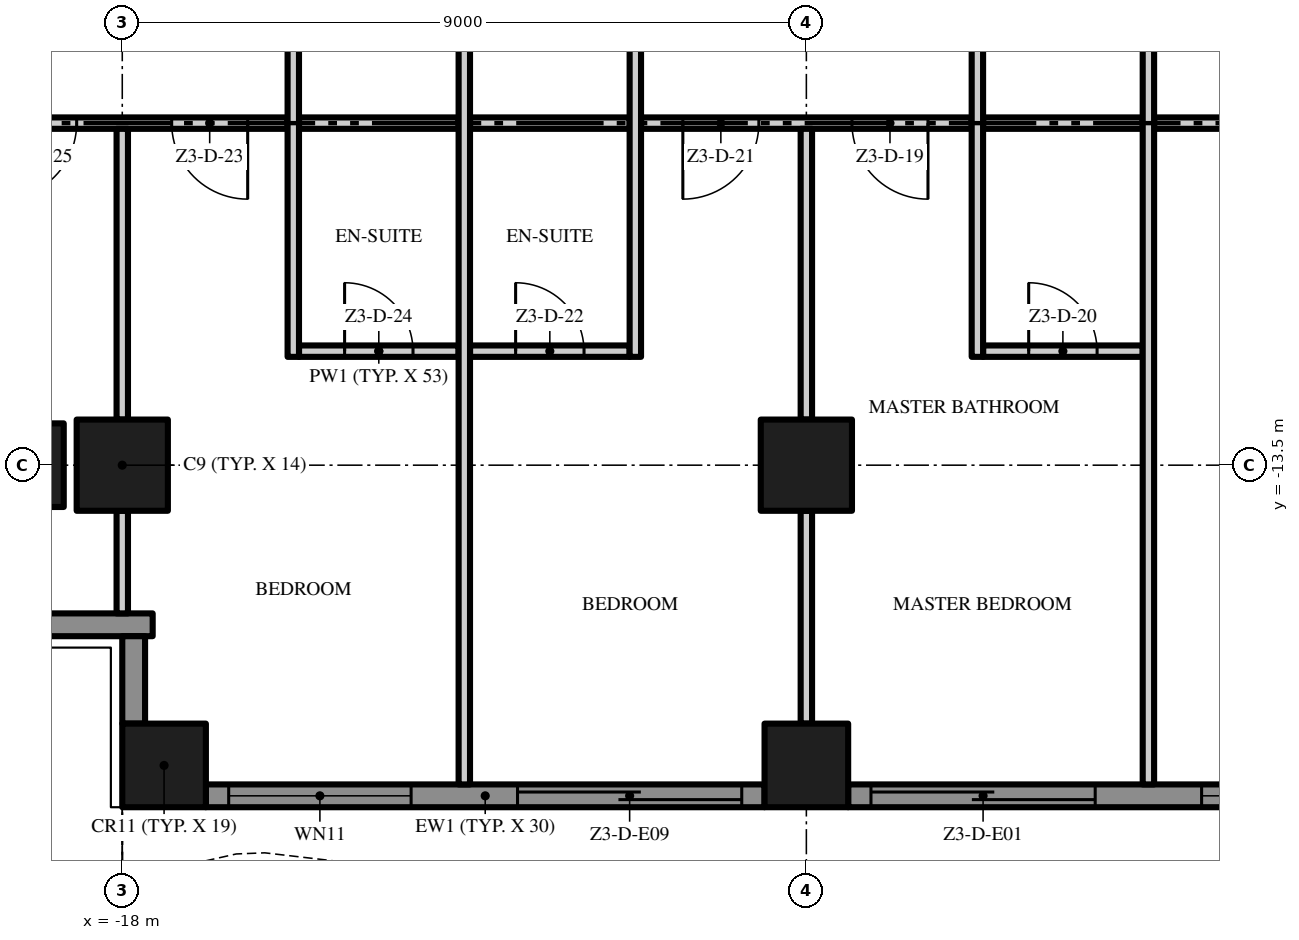
"""IFC4 building model, lengths in metres.
Left out: names, types, materials, properties, quantities, classifications, styles, units other than length and angle.
Written with IfcOpenShell. Run it as: python <this file> out.ifc"""

import sys

from ifc_helpers import new_model, si_unit, direction, frame, frame_2d, origin, origin_2d, place, context, subcontext, project, spatial, polyline, rectangle, outline, extrude, element, fill, save


model = new_model("IFC4")
c1 = context("Model", 3, precision=1e-05, world=origin(), true_north=direction((0.0, 1.0)))
c2 = subcontext(c1, "Body", "Model", "MODEL_VIEW")
j1 = project(units=[si_unit("LENGTHUNIT", "METRE"), si_unit("PLANEANGLEUNIT", "RADIAN")], contexts=[c1])
p1 = place(None, origin())
s1 = spatial("IfcSite", under=j1, at=p1, CompositionType="ELEMENT")
p2 = place(p1, origin())
s2 = spatial("IfcBuilding", under=s1, at=p2, CompositionType="ELEMENT")
p3 = place(p2, frame((0.0, 0.0, 163.0)))
s3 = spatial("IfcBuildingStorey", under=s2, at=p3, CompositionType="ELEMENT", Elevation=163.0)
p4 = place(p3, frame((-18.0, -13.5, 0.0), z_axis=(0.0, 0.0, 1.0), x_axis=(1.0, 0.0, 0.0)))
e1 = element("IfcColumn", 1, at=p4, inside=s3, PredefinedType="COLUMN", context=c2, shape_type="SweptSolid", body=[
    extrude(rectangle(XDim=1.2, YDim=1.2, at=origin_2d()), origin(), (0.0, 0.0, 1.0), 3.5),
])
for number, where, z_axis, x_axis in (
    (2, (-17.45, -17.45, 0.0), (0.0, 0.0, 1.0), (1.0, 0.0, 0.0)),
    (3, (-19.32, -13.5, 0.0), (0.0, 0.0, 1.0), (1.0, 0.0, 0.0)),
):
    element("IfcColumn", number, at=place(p3, frame(where, z_axis=z_axis, x_axis=x_axis)), inside=s3, PredefinedType="COLUMN", context=c2, shape_type="SweptSolid", body=[
        extrude(rectangle(XDim=1.1, YDim=1.1, at=origin_2d()), origin(), (0.0, 0.0, 1.0), 3.5),
    ])
p5 = place(p3, frame((-9.0, -13.5, 0.0), z_axis=(0.0, 0.0, 1.0), x_axis=(1.0, 0.0, 0.0)))
e4 = element("IfcColumn", 4, at=p5, inside=s3, PredefinedType="COLUMN", context=c2, shape_type="SweptSolid", body=[
    extrude(rectangle(XDim=1.2, YDim=1.2, at=origin_2d()), origin(), (0.0, 0.0, 1.0), 3.5),
])
p6 = place(p3, frame((-9.0, -17.45, 0.0), z_axis=(0.0, 0.0, 1.0), x_axis=(1.0, 0.0, 0.0)))
e5 = element("IfcColumn", 5, at=p6, inside=s3, PredefinedType="COLUMN", context=c2, shape_type="SweptSolid", body=[
    extrude(rectangle(XDim=1.1, YDim=1.1, at=origin_2d()), origin(), (0.0, 0.0, 1.0), 3.5),
])
p7 = place(p3, frame((-9.55, -17.85, 0.0), z_axis=(0.0, 0.0, 1.0), x_axis=(-1.0, 0.0, 0.0)))
e6 = element("IfcWall", 6, at=p7, inside=s3, PredefinedType="SOLIDWALL", context=c2, shape_type="SweptSolid", body=[
    extrude(rectangle(XDim=7.35, YDim=0.3, at=frame_2d((3.675, 0.0))), origin(), (0.0, 0.0, 1.0), 3.5),
])
p8 = place(p7, frame((4.65, 0.0, 0.45)))
e7 = element("IfcOpeningElement", 7, at=p8, cuts=e6, PredefinedType="OPENING", context=c2, shape_type="SweptSolid", body=[
    extrude(rectangle(XDim=2.4, YDim=2.65, at=frame_2d((1.2, 1.325))), frame((0.0, 0.16, 0.0), z_axis=(0.0, -1.0, 0.0), x_axis=(1.0, 0.0, 0.0)), (0.0, 0.0, 1.0), 0.32),
])
p9 = place(p7, frame((0.3, 0.0, 0.0)))
e8 = element("IfcOpeningElement", 8, at=p9, cuts=e6, PredefinedType="OPENING", context=c2, shape_type="SweptSolid", body=[
    extrude(rectangle(XDim=2.95, YDim=2.4, at=frame_2d((1.475, 1.2))), frame((0.0, 0.16, 0.0), z_axis=(0.0, -1.0, 0.0), x_axis=(1.0, 0.0, 0.0)), (0.0, 0.0, 1.0), 0.32),
])
p10 = place(p3, frame((-0.55, -17.85, 0.0), z_axis=(0.0, 0.0, 1.0), x_axis=(-1.0, 0.0, 0.0)))
e9 = element("IfcWall", 9, at=p10, inside=s3, PredefinedType="SOLIDWALL", context=c2, shape_type="SweptSolid", body=[
    extrude(rectangle(XDim=7.9, YDim=0.3, at=frame_2d((3.95, 0.0))), origin(), (0.0, 0.0, 1.0), 3.5),
])
p11 = place(p10, frame((4.65, 0.0, 0.0)))
e10 = element("IfcOpeningElement", 10, at=p11, cuts=e9, PredefinedType="OPENING", context=c2, shape_type="SweptSolid", body=[
    extrude(rectangle(XDim=2.95, YDim=2.4, at=frame_2d((1.475, 1.2))), frame((0.0, 0.16, 0.0), z_axis=(0.0, -1.0, 0.0), x_axis=(1.0, 0.0, 0.0)), (0.0, 0.0, 1.0), 0.32),
])
p12 = place(p10, frame((0.3, 0.0, 0.45)))
e11 = element("IfcOpeningElement", 11, at=p12, cuts=e9, PredefinedType="OPENING", context=c2, shape_type="SweptSolid", body=[
    extrude(rectangle(XDim=2.95, YDim=2.65, at=frame_2d((1.475, 1.325))), frame((0.0, 0.16, 0.0), z_axis=(0.0, -1.0, 0.0), x_axis=(1.0, 0.0, 0.0)), (0.0, 0.0, 1.0), 0.32),
])
p13 = place(p3, frame((-17.6, -15.6, 0.0), z_axis=(0.0, 0.0, 1.0), x_axis=(-1.0, 0.0, 0.0)))
e12 = element("IfcWall", 12, at=p13, inside=s3, PredefinedType="SOLIDWALL", context=c2, shape_type="SweptSolid", body=[
    extrude(rectangle(XDim=2.35, YDim=0.3, at=frame_2d((1.175, 0.0))), origin(), (0.0, 0.0, 1.0), 3.5),
])
p14 = place(p3, frame((-17.85, -16.9, 0.0), z_axis=(0.0, 0.0, 1.0), x_axis=(0.0, 1.0, 0.0)))
e13 = element("IfcWall", 13, at=p14, inside=s3, PredefinedType="SOLIDWALL", context=c2, shape_type="SweptSolid", body=[
    extrude(rectangle(XDim=1.15, YDim=0.3, at=frame_2d((0.575, 0.0))), origin(), (0.0, 0.0, 1.0), 3.5),
])
p15 = place(p3, origin())
e14 = element("IfcWall", 14, at=p15, inside=s3, PredefinedType="USERDEFINED", context=c2, shape_type="SweptSolid", body=[
    extrude(outline(polyline([(-18.0, -18.951), (-16.5, -18.615), (-16.125, -18.6), (-15.0, -18.731), (-13.5, -19.255), (-12.0, -19.988), (-10.5, -20.649), (-9.0, -20.985), (-8.625, -21.0), (-7.5, -20.869), (-6.0, -20.345), (-4.5, -19.612), (-3.0, -18.951), (-1.5, -18.615), (-1.125, -18.6), (0.0, -18.731), (1.5, -19.255), (3.0, -19.988), (4.5, -20.649), (6.0, -20.985), (6.375, -21.0), (7.5, -20.869), (9.0, -20.345), (10.5, -19.612), (12.0, -18.951), (13.5, -18.615), (13.875, -18.6), (15.0, -18.731), (16.5, -19.255), (18.0, -19.988), (18.11, -19.763), (16.596, -19.024), (15.056, -18.486), (13.885, -18.349), (13.467, -18.366), (11.921, -18.713), (10.395, -19.385), (8.904, -20.114), (7.444, -20.624), (6.365, -20.749), (6.033, -20.736), (4.579, -20.41), (3.105, -19.761), (1.596, -19.024), (0.056, -18.486), (-1.115, -18.349), (-1.533, -18.366), (-3.079, -18.713), (-4.605, -19.385), (-6.096, -20.114), (-7.556, -20.624), (-8.635, -20.749), (-8.967, -20.736), (-10.421, -20.41), (-11.895, -19.761), (-13.404, -19.024), (-14.944, -18.486), (-16.115, -18.349), (-16.533, -18.366), (-18.055, -18.708), (-18.0, -18.951)])), origin(), (0.0, 0.0, 1.0), 0.9),
])
p16 = place(p3, frame((-15.675, -12.0, 0.0), z_axis=(0.0, 0.0, 1.0), x_axis=(1.0, 0.0, 0.0)))
e15 = element("IfcWall", 15, at=p16, inside=s3, PredefinedType="PARTITIONING", context=c2, shape_type="SweptSolid", body=[
    extrude(rectangle(XDim=2.1, YDim=0.15, at=frame_2d((1.05, 0.0))), origin(), (0.0, 0.0, 1.0), 3.5),
])
p17 = place(p16, frame((0.6, 0.0, 0.0)))
e16 = element("IfcOpeningElement", 16, at=p17, cuts=e15, PredefinedType="OPENING", context=c2, shape_type="SweptSolid", body=[
    extrude(rectangle(XDim=0.9, YDim=2.1, at=frame_2d((0.45, 1.05))), frame((0.0, 0.085, 0.0), z_axis=(0.0, -1.0, 0.0), x_axis=(1.0, 0.0, 0.0)), (0.0, 0.0, 1.0), 0.17),
])
p18 = place(p3, frame((-13.425, -12.0, 0.0), z_axis=(0.0, 0.0, 1.0), x_axis=(1.0, 0.0, 0.0)))
e17 = element("IfcWall", 17, at=p18, inside=s3, PredefinedType="PARTITIONING", context=c2, shape_type="SweptSolid", body=[
    extrude(rectangle(XDim=2.1, YDim=0.15, at=frame_2d((1.05, 0.0))), origin(), (0.0, 0.0, 1.0), 3.5),
])
p19 = place(p18, frame((0.6, 0.0, 0.0)))
e18 = element("IfcOpeningElement", 18, at=p19, cuts=e17, PredefinedType="OPENING", context=c2, shape_type="SweptSolid", body=[
    extrude(rectangle(XDim=0.9, YDim=2.1, at=frame_2d((0.45, 1.05))), frame((0.0, 0.085, 0.0), z_axis=(0.0, -1.0, 0.0), x_axis=(1.0, 0.0, 0.0)), (0.0, 0.0, 1.0), 0.17),
])
p20 = place(p3, frame((-6.675, -12.0, 0.0), z_axis=(0.0, 0.0, 1.0), x_axis=(1.0, 0.0, 0.0)))
e19 = element("IfcWall", 19, at=p20, inside=s3, PredefinedType="PARTITIONING", context=c2, shape_type="SweptSolid", body=[
    extrude(rectangle(XDim=2.1, YDim=0.15, at=frame_2d((1.05, 0.0))), origin(), (0.0, 0.0, 1.0), 3.5),
])
p21 = place(p20, frame((0.6, 0.0, 0.0)))
e20 = element("IfcOpeningElement", 20, at=p21, cuts=e19, PredefinedType="OPENING", context=c2, shape_type="SweptSolid", body=[
    extrude(rectangle(XDim=0.9, YDim=2.1, at=frame_2d((0.45, 1.05))), frame((0.0, 0.085, 0.0), z_axis=(0.0, -1.0, 0.0), x_axis=(1.0, 0.0, 0.0)), (0.0, 0.0, 1.0), 0.17),
])
p22 = place(p3, frame((-15.825, -9.0, 0.0), z_axis=(0.0, 0.0, 1.0), x_axis=(-1.0, 0.0, 0.0)))
e21 = element("IfcWall", 21, at=p22, inside=s3, PredefinedType="PARTITIONING", context=c2, shape_type="SweptSolid", body=[
    extrude(rectangle(XDim=6.375, YDim=0.15, at=frame_2d((3.188, 0.0))), origin(), (0.0, 0.0, 1.0), 3.5),
])
p23 = place(p22, frame((0.525, 0.0, 0.0)))
e22 = element("IfcOpeningElement", 22, at=p23, cuts=e21, PredefinedType="OPENING", context=c2, shape_type="SweptSolid", body=[
    extrude(rectangle(XDim=1.0, YDim=2.4, at=frame_2d((0.5, 1.2))), frame((0.0, 0.085, 0.0), z_axis=(0.0, -1.0, 0.0), x_axis=(1.0, 0.0, 0.0)), (0.0, 0.0, 1.0), 0.17),
])
p24 = place(p22, frame((2.775, 0.0, 0.0)))
e23 = element("IfcOpeningElement", 23, at=p24, cuts=e21, PredefinedType="OPENING", context=c2, shape_type="SweptSolid", body=[
    extrude(rectangle(XDim=1.0, YDim=2.4, at=frame_2d((0.5, 1.2))), frame((0.0, 0.085, 0.0), z_axis=(0.0, -1.0, 0.0), x_axis=(1.0, 0.0, 0.0)), (0.0, 0.0, 1.0), 0.17),
])
for number, where, z_axis, x_axis in (
    (24, (-15.675, -9.0, 0.0), (0.0, 0.0, 1.0), (1.0, 0.0, 0.0)),
    (25, (-13.425, -9.0, 0.0), (0.0, 0.0, 1.0), (1.0, 0.0, 0.0)),
):
    element("IfcWall", number, at=place(p3, frame(where, z_axis=z_axis, x_axis=x_axis)), inside=s3, PredefinedType="PARTITIONING", context=c2, shape_type="SweptSolid", body=[
        extrude(rectangle(XDim=2.1, YDim=0.15, at=frame_2d((1.05, 0.0))), origin(), (0.0, 0.0, 1.0), 3.5),
    ])
p25 = place(p3, frame((-6.825, -9.0, 0.0), z_axis=(0.0, 0.0, 1.0), x_axis=(-1.0, 0.0, 0.0)))
e26 = element("IfcWall", 26, at=p25, inside=s3, PredefinedType="PARTITIONING", context=c2, shape_type="SweptSolid", body=[
    extrude(rectangle(XDim=4.35, YDim=0.15, at=frame_2d((2.175, 0.0))), origin(), (0.0, 0.0, 1.0), 3.5),
])
p26 = place(p25, frame((0.575, 0.0, 0.0)))
e27 = element("IfcOpeningElement", 27, at=p26, cuts=e26, PredefinedType="OPENING", context=c2, shape_type="SweptSolid", body=[
    extrude(rectangle(XDim=1.0, YDim=2.4, at=frame_2d((0.5, 1.2))), frame((0.0, 0.085, 0.0), z_axis=(0.0, -1.0, 0.0), x_axis=(1.0, 0.0, 0.0)), (0.0, 0.0, 1.0), 0.17),
])
p27 = place(p25, frame((2.8, 0.0, 0.0)))
e28 = element("IfcOpeningElement", 28, at=p27, cuts=e26, PredefinedType="OPENING", context=c2, shape_type="SweptSolid", body=[
    extrude(rectangle(XDim=1.0, YDim=2.4, at=frame_2d((0.5, 1.2))), frame((0.0, 0.085, 0.0), z_axis=(0.0, -1.0, 0.0), x_axis=(1.0, 0.0, 0.0)), (0.0, 0.0, 1.0), 0.17),
])
p28 = place(p3, frame((-6.675, -9.0, 0.0), z_axis=(0.0, 0.0, 1.0), x_axis=(1.0, 0.0, 0.0)))
e29 = element("IfcWall", 29, at=p28, inside=s3, PredefinedType="PARTITIONING", context=c2, shape_type="SweptSolid", body=[
    extrude(rectangle(XDim=2.1, YDim=0.15, at=frame_2d((1.05, 0.0))), origin(), (0.0, 0.0, 1.0), 3.5),
])
p29 = place(p3, frame((4.4, -9.0, 0.0), z_axis=(0.0, 0.0, 1.0), x_axis=(-1.0, 0.0, 0.0)))
e30 = element("IfcWall", 30, at=p29, inside=s3, PredefinedType="PARTITIONING", context=c2, shape_type="SweptSolid", body=[
    extrude(rectangle(XDim=8.825, YDim=0.15, at=frame_2d((4.412, 0.0))), origin(), (0.0, 0.0, 1.0), 3.5),
])
p30 = place(p29, frame((6.125, 0.0, 0.0)))
e31 = element("IfcOpeningElement", 31, at=p30, cuts=e30, PredefinedType="OPENING", context=c2, shape_type="SweptSolid", body=[
    extrude(rectangle(XDim=1.8, YDim=2.4, at=frame_2d((0.9, 1.2))), frame((0.0, 0.085, 0.0), z_axis=(0.0, -1.0, 0.0), x_axis=(1.0, 0.0, 0.0)), (0.0, 0.0, 1.0), 0.17),
])
p31 = place(p3, frame((-18.0, -15.45, 0.0), z_axis=(0.0, 0.0, 1.0), x_axis=(0.0, 1.0, 0.0)))
e32 = element("IfcWall", 32, at=p31, inside=s3, PredefinedType="PARTITIONING", context=c2, shape_type="SweptSolid", body=[
    extrude(rectangle(XDim=1.35, YDim=0.15, at=frame_2d((0.675, 0.0))), origin(), (0.0, 0.0, 1.0), 3.5),
])
p32 = place(p3, frame((-18.0, -12.9, 0.0), z_axis=(0.0, 0.0, 1.0), x_axis=(0.0, 1.0, 0.0)))
e33 = element("IfcWall", 33, at=p32, inside=s3, PredefinedType="PARTITIONING", context=c2, shape_type="SweptSolid", body=[
    extrude(rectangle(XDim=3.825, YDim=0.15, at=frame_2d((1.913, 0.0))), origin(), (0.0, 0.0, 1.0), 3.5),
])
p33 = place(p3, frame((-15.75, -12.075, 0.0), z_axis=(0.0, 0.0, 1.0), x_axis=(0.0, 1.0, 0.0)))
e34 = element("IfcWall", 34, at=p33, inside=s3, PredefinedType="PARTITIONING", context=c2, shape_type="SweptSolid", body=[
    extrude(rectangle(XDim=7.65, YDim=0.15, at=frame_2d((3.825, 0.0))), origin(), (0.0, 0.0, 1.0), 3.5),
])
p34 = place(p3, frame((-13.5, -17.7, 0.0), z_axis=(0.0, 0.0, 1.0), x_axis=(0.0, 1.0, 0.0)))
e35 = element("IfcWall", 35, at=p34, inside=s3, PredefinedType="PARTITIONING", context=c2, shape_type="SweptSolid", body=[
    extrude(rectangle(XDim=13.125, YDim=0.15, at=frame_2d((6.562, 0.0))), origin(), (0.0, 0.0, 1.0), 3.5),
])
p35 = place(p3, frame((-11.25, -12.075, 0.0), z_axis=(0.0, 0.0, 1.0), x_axis=(0.0, 1.0, 0.0)))
e36 = element("IfcWall", 36, at=p35, inside=s3, PredefinedType="PARTITIONING", context=c2, shape_type="SweptSolid", body=[
    extrude(rectangle(XDim=7.65, YDim=0.15, at=frame_2d((3.825, 0.0))), origin(), (0.0, 0.0, 1.0), 3.5),
])
p36 = place(p3, frame((-9.0, -16.9, 0.0), z_axis=(0.0, 0.0, 1.0), x_axis=(0.0, 1.0, 0.0)))
e37 = element("IfcWall", 37, at=p36, inside=s3, PredefinedType="PARTITIONING", context=c2, shape_type="SweptSolid", body=[
    extrude(rectangle(XDim=2.8, YDim=0.15, at=frame_2d((1.4, 0.0))), origin(), (0.0, 0.0, 1.0), 3.5),
])
p37 = place(p3, frame((-9.0, -12.9, 0.0), z_axis=(0.0, 0.0, 1.0), x_axis=(0.0, 1.0, 0.0)))
e38 = element("IfcWall", 38, at=p37, inside=s3, PredefinedType="PARTITIONING", context=c2, shape_type="SweptSolid", body=[
    extrude(rectangle(XDim=3.825, YDim=0.15, at=frame_2d((1.913, 0.0))), origin(), (0.0, 0.0, 1.0), 3.5),
])
p38 = place(p3, frame((-6.75, -12.075, 0.0), z_axis=(0.0, 0.0, 1.0), x_axis=(0.0, 1.0, 0.0)))
e39 = element("IfcWall", 39, at=p38, inside=s3, PredefinedType="PARTITIONING", context=c2, shape_type="SweptSolid", body=[
    extrude(rectangle(XDim=7.65, YDim=0.15, at=frame_2d((3.825, 0.0))), origin(), (0.0, 0.0, 1.0), 3.5),
])
p39 = place(p3, frame((-4.5, -17.7, 0.0), z_axis=(0.0, 0.0, 1.0), x_axis=(0.0, 1.0, 0.0)))
e40 = element("IfcWall", 40, at=p39, inside=s3, PredefinedType="PARTITIONING", context=c2, shape_type="SweptSolid", body=[
    extrude(rectangle(XDim=13.275, YDim=0.15, at=frame_2d((6.638, 0.0))), origin(), (0.0, 0.0, 1.0), 3.5),
])
p40 = place(p39, frame((10.5, 0.0, 0.0)))
e41 = element("IfcOpeningElement", 41, at=p40, cuts=e40, PredefinedType="OPENING", context=c2, shape_type="SweptSolid", body=[
    extrude(rectangle(XDim=0.9, YDim=2.1, at=frame_2d((0.45, 1.05))), frame((0.0, 0.085, 0.0), z_axis=(0.0, -1.0, 0.0), x_axis=(1.0, 0.0, 0.0)), (0.0, 0.0, 1.0), 0.17),
])
p41 = place(p8, origin())
e42 = element("IfcWindow", 42, at=p41, inside=s3, PartitioningType="SINGLE_PANEL", PredefinedType="WINDOW", context=c2, shape_type="SweptSolid", body=[
    extrude(rectangle(XDim=2.4, YDim=2.65, at=frame_2d((1.2, 1.325))), frame((0.0, 0.03, 0.0), z_axis=(0.0, -1.0, 0.0), x_axis=(1.0, 0.0, 0.0)), (0.0, 0.0, 1.0), 0.06),
])
fill(e7, e42)
p42 = place(p9, origin())
e43 = element("IfcDoor", 43, at=p42, inside=s3, OperationType="SINGLE_SWING_LEFT", PredefinedType="DOOR", context=c2, shape_type="SweptSolid", body=[
    extrude(rectangle(XDim=2.95, YDim=2.4, at=frame_2d((1.475, 1.2))), frame((0.0, 0.025, 0.0), z_axis=(0.0, -1.0, 0.0), x_axis=(1.0, 0.0, 0.0)), (0.0, 0.0, 1.0), 0.05),
])
fill(e8, e43)
p43 = place(p11, origin())
e44 = element("IfcDoor", 44, at=p43, inside=s3, OperationType="SINGLE_SWING_LEFT", PredefinedType="DOOR", context=c2, shape_type="SweptSolid", body=[
    extrude(rectangle(XDim=2.95, YDim=2.4, at=frame_2d((1.475, 1.2))), frame((0.0, 0.025, 0.0), z_axis=(0.0, -1.0, 0.0), x_axis=(1.0, 0.0, 0.0)), (0.0, 0.0, 1.0), 0.05),
])
fill(e10, e44)
p44 = place(p12, origin())
e45 = element("IfcWindow", 45, at=p44, inside=s3, PartitioningType="SINGLE_PANEL", PredefinedType="WINDOW", context=c2, shape_type="SweptSolid", body=[
    extrude(rectangle(XDim=2.95, YDim=2.65, at=frame_2d((1.475, 1.325))), frame((0.0, 0.03, 0.0), z_axis=(0.0, -1.0, 0.0), x_axis=(1.0, 0.0, 0.0)), (0.0, 0.0, 1.0), 0.06),
])
fill(e11, e45)
p45 = place(p26, origin())
e46 = element("IfcDoor", 46, at=p45, inside=s3, OperationType="SINGLE_SWING_LEFT", PredefinedType="DOOR", context=c2, shape_type="SweptSolid", body=[
    extrude(rectangle(XDim=1.0, YDim=2.4, at=frame_2d((0.5, 1.2))), frame((0.0, 0.025, 0.0), z_axis=(0.0, -1.0, 0.0), x_axis=(1.0, 0.0, 0.0)), (0.0, 0.0, 1.0), 0.05),
])
fill(e27, e46)
p46 = place(p21, origin())
e47 = element("IfcDoor", 47, at=p46, inside=s3, OperationType="SINGLE_SWING_LEFT", PredefinedType="DOOR", context=c2, shape_type="SweptSolid", body=[
    extrude(rectangle(XDim=0.9, YDim=2.1, at=frame_2d((0.45, 1.05))), frame((0.0, 0.025, 0.0), z_axis=(0.0, -1.0, 0.0), x_axis=(1.0, 0.0, 0.0)), (0.0, 0.0, 1.0), 0.05),
])
fill(e20, e47)
p47 = place(p27, origin())
e48 = element("IfcDoor", 48, at=p47, inside=s3, OperationType="SINGLE_SWING_RIGHT", PredefinedType="DOOR", context=c2, shape_type="SweptSolid", body=[
    extrude(rectangle(XDim=1.0, YDim=2.4, at=frame_2d((0.5, 1.2))), frame((0.0, 0.025, 0.0), z_axis=(0.0, -1.0, 0.0), x_axis=(1.0, 0.0, 0.0)), (0.0, 0.0, 1.0), 0.05),
])
fill(e28, e48)
p48 = place(p19, origin())
e49 = element("IfcDoor", 49, at=p48, inside=s3, OperationType="SINGLE_SWING_LEFT", PredefinedType="DOOR", context=c2, shape_type="SweptSolid", body=[
    extrude(rectangle(XDim=0.9, YDim=2.1, at=frame_2d((0.45, 1.05))), frame((0.0, 0.025, 0.0), z_axis=(0.0, -1.0, 0.0), x_axis=(1.0, 0.0, 0.0)), (0.0, 0.0, 1.0), 0.05),
])
fill(e18, e49)
p49 = place(p23, origin())
e50 = element("IfcDoor", 50, at=p49, inside=s3, OperationType="SINGLE_SWING_LEFT", PredefinedType="DOOR", context=c2, shape_type="SweptSolid", body=[
    extrude(rectangle(XDim=1.0, YDim=2.4, at=frame_2d((0.5, 1.2))), frame((0.0, 0.025, 0.0), z_axis=(0.0, -1.0, 0.0), x_axis=(1.0, 0.0, 0.0)), (0.0, 0.0, 1.0), 0.05),
])
fill(e22, e50)
p50 = place(p17, origin())
e51 = element("IfcDoor", 51, at=p50, inside=s3, OperationType="SINGLE_SWING_LEFT", PredefinedType="DOOR", context=c2, shape_type="SweptSolid", body=[
    extrude(rectangle(XDim=0.9, YDim=2.1, at=frame_2d((0.45, 1.05))), frame((0.0, 0.025, 0.0), z_axis=(0.0, -1.0, 0.0), x_axis=(1.0, 0.0, 0.0)), (0.0, 0.0, 1.0), 0.05),
])
fill(e16, e51)
p51 = place(p24, origin())
e52 = element("IfcDoor", 52, at=p51, inside=s3, OperationType="SINGLE_SWING_RIGHT", PredefinedType="DOOR", context=c2, shape_type="SweptSolid", body=[
    extrude(rectangle(XDim=1.0, YDim=2.4, at=frame_2d((0.5, 1.2))), frame((0.0, 0.025, 0.0), z_axis=(0.0, -1.0, 0.0), x_axis=(1.0, 0.0, 0.0)), (0.0, 0.0, 1.0), 0.05),
])
fill(e23, e52)
save(model, sys.argv[1])
